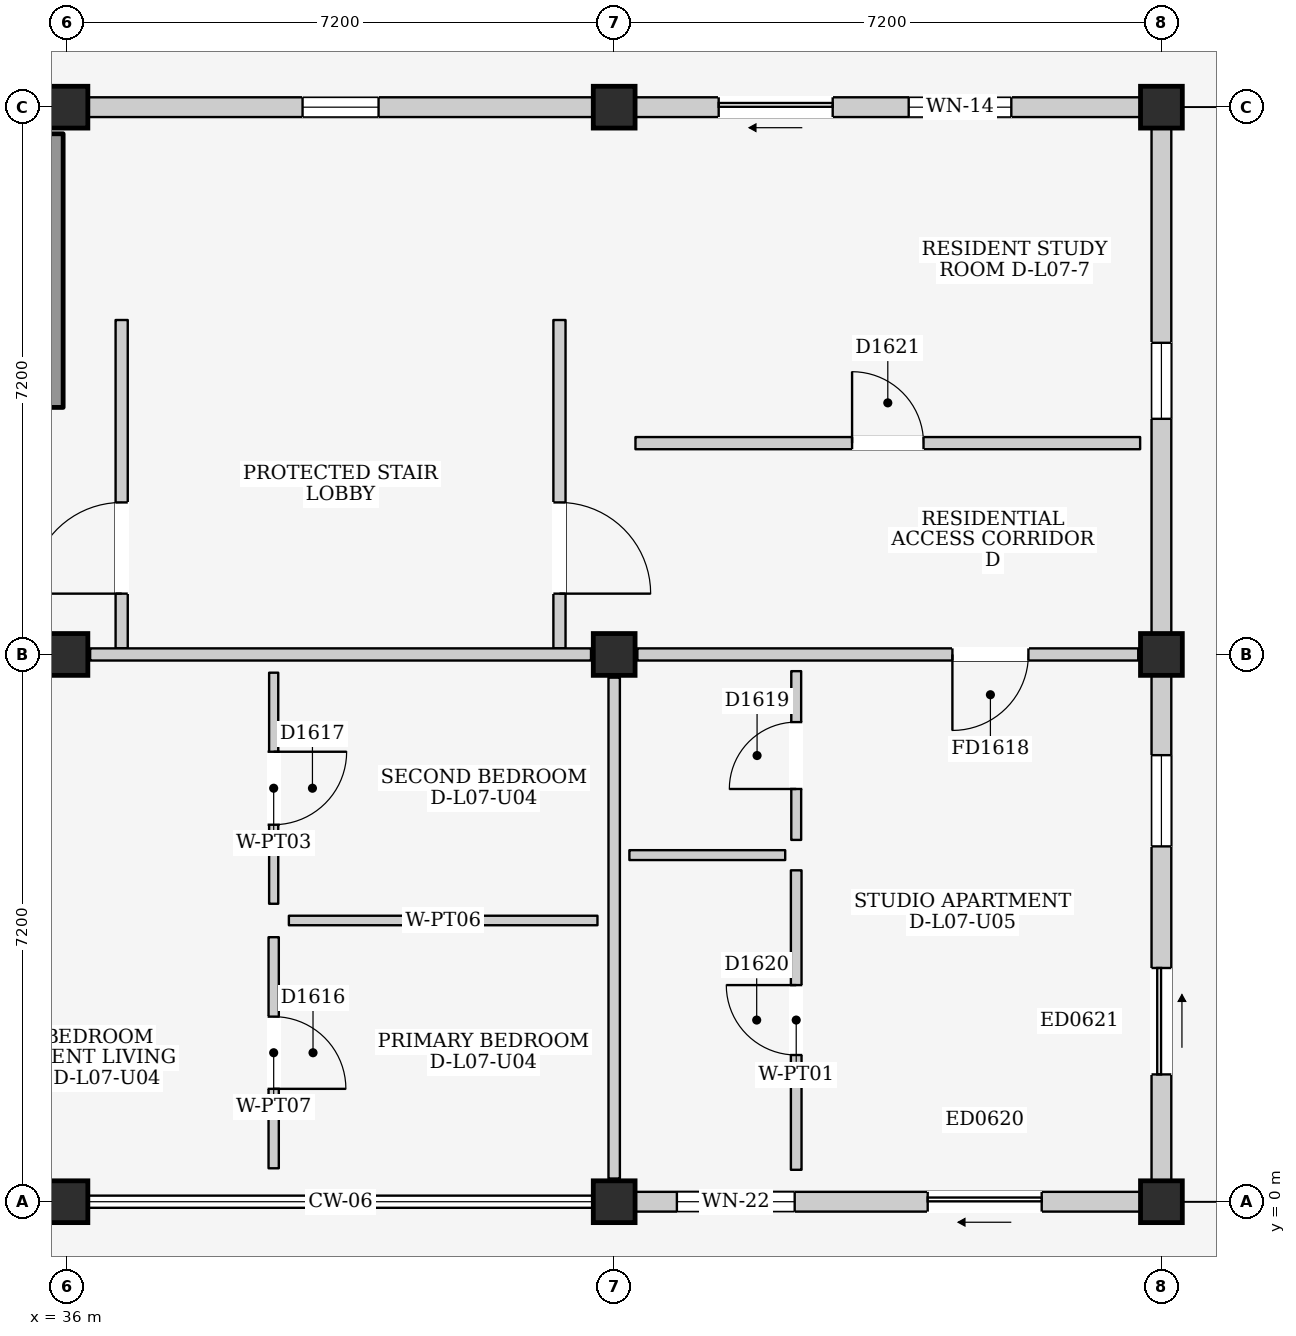
"""IFC4 building model, lengths in metres.
Left out: names, types, materials, properties, quantities, classifications, styles, units other than length and angle.
Written with IfcOpenShell. Run it as: python <this file> out.ifc"""

import sys

from ifc_helpers import new_model, si_unit, direction, frame, frame_2d, origin, origin_2d, place, context, subcontext, project, spatial, rectangle, extrude, element, fill, save


model = new_model("IFC4")
c1 = context("Model", 3, precision=1e-05, world=origin(), true_north=direction((0.0, 1.0)))
c2 = subcontext(c1, "Body", "Model", "MODEL_VIEW")
j1 = project(units=[si_unit("LENGTHUNIT", "METRE"), si_unit("PLANEANGLEUNIT", "RADIAN")], contexts=[c1])
p1 = place(None, origin())
s1 = spatial("IfcSite", under=j1, at=p1, CompositionType="ELEMENT")
p2 = place(p1, origin())
s2 = spatial("IfcBuilding", under=s1, at=p2, CompositionType="ELEMENT")
p3 = place(p2, frame((0.0, 0.0, 25.1)))
s3 = spatial("IfcBuildingStorey", under=s2, at=p3, CompositionType="ELEMENT", Elevation=25.1)
for number, where, z_axis, x_axis in (
    (1, (36.0, 0.0, 0.0), (0.0, 0.0, 1.0), (1.0, 0.0, 0.0)),
    (2, (36.0, 7.2, 0.0), (0.0, 0.0, 1.0), (1.0, 0.0, 0.0)),
    (3, (36.0, 14.4, 0.0), (0.0, 0.0, 1.0), (1.0, 0.0, 0.0)),
    (4, (43.2, 0.0, 0.0), (0.0, 0.0, 1.0), (1.0, 0.0, 0.0)),
    (5, (43.2, 7.2, 0.0), (0.0, 0.0, 1.0), (1.0, 0.0, 0.0)),
    (6, (43.2, 14.4, 0.0), (0.0, 0.0, 1.0), (1.0, 0.0, 0.0)),
    (7, (50.4, 0.0, 0.0), (0.0, 0.0, 1.0), (1.0, 0.0, 0.0)),
    (8, (50.4, 7.2, 0.0), (0.0, 0.0, 1.0), (1.0, 0.0, 0.0)),
    (9, (50.4, 14.4, 0.0), (0.0, 0.0, 1.0), (1.0, 0.0, 0.0)),
):
    element("IfcColumn", number, at=place(p3, frame(where, z_axis=z_axis, x_axis=x_axis)), inside=s3, PredefinedType="COLUMN", context=c2, shape_type="SweptSolid", body=[
        extrude(rectangle(XDim=0.55, YDim=0.55, at=origin_2d()), origin(), (0.0, 0.0, 1.0), 3.2),
    ])
p4 = place(p3, frame((36.275, 14.4, 0.0), z_axis=(0.0, 0.0, 1.0), x_axis=(1.0, 0.0, 0.0)))
e10 = element("IfcWall", 10, at=p4, inside=s3, PredefinedType="ELEMENTEDWALL", context=c2, shape_type="SweptSolid", body=[
    extrude(rectangle(XDim=6.65, YDim=0.26, at=frame_2d((3.325, 0.0))), origin(), (0.0, 0.0, 1.0), 2.375),
])
p5 = place(p4, frame((2.825, 0.0, 1.2)))
e11 = element("IfcOpeningElement", 11, at=p5, cuts=e10, PredefinedType="OPENING", context=c2, shape_type="SweptSolid", body=[
    extrude(rectangle(XDim=1.0, YDim=0.9, at=frame_2d((0.5, 0.45))), frame((0.0, 0.145, 0.0), z_axis=(0.0, -1.0, 0.0), x_axis=(1.0, 0.0, 0.0)), (0.0, 0.0, 1.0), 0.29),
])
p6 = place(p3, frame((43.475, 0.0, 0.0), z_axis=(0.0, 0.0, 1.0), x_axis=(1.0, 0.0, 0.0)))
e12 = element("IfcWall", 12, at=p6, inside=s3, PredefinedType="ELEMENTEDWALL", context=c2, shape_type="SweptSolid", body=[
    extrude(rectangle(XDim=6.65, YDim=0.26, at=frame_2d((3.325, 0.0))), origin(), (0.0, 0.0, 1.0), 2.525),
])
p7 = place(p6, frame((3.85, 0.0, 0.0)))
e13 = element("IfcOpeningElement", 13, at=p7, cuts=e12, PredefinedType="OPENING", context=c2, shape_type="SweptSolid", body=[
    extrude(rectangle(XDim=1.5, YDim=2.12, at=frame_2d((0.75, 1.06))), frame((0.0, 0.145, 0.0), z_axis=(0.0, -1.0, 0.0), x_axis=(1.0, 0.0, 0.0)), (0.0, 0.0, 1.0), 0.29),
])
p8 = place(p6, frame((0.55, 0.0, 0.9)))
e14 = element("IfcOpeningElement", 14, at=p8, cuts=e12, PredefinedType="OPENING", context=c2, shape_type="SweptSolid", body=[
    extrude(rectangle(XDim=1.55, YDim=1.45, at=frame_2d((0.775, 0.725))), frame((0.0, 0.145, 0.0), z_axis=(0.0, -1.0, 0.0), x_axis=(1.0, 0.0, 0.0)), (0.0, 0.0, 1.0), 0.29),
])
p9 = place(p3, frame((50.4, 0.275, 0.0), z_axis=(0.0, 0.0, 1.0), x_axis=(0.0, 1.0, 0.0)))
e15 = element("IfcWall", 15, at=p9, inside=s3, PredefinedType="ELEMENTEDWALL", context=c2, shape_type="SweptSolid", body=[
    extrude(rectangle(XDim=6.65, YDim=0.26, at=frame_2d((3.325, 0.0))), origin(), (0.0, 0.0, 1.0), 2.475),
])
p10 = place(p9, frame((1.4, 0.0, 0.0)))
e16 = element("IfcOpeningElement", 16, at=p10, cuts=e15, PredefinedType="OPENING", context=c2, shape_type="SweptSolid", body=[
    extrude(rectangle(XDim=1.4, YDim=2.1, at=frame_2d((0.7, 1.05))), frame((0.0, 0.145, 0.0), z_axis=(0.0, -1.0, 0.0), x_axis=(1.0, 0.0, 0.0)), (0.0, 0.0, 1.0), 0.29),
])
p11 = place(p9, frame((4.4, 0.0, 0.95)))
e17 = element("IfcOpeningElement", 17, at=p11, cuts=e15, PredefinedType="OPENING", context=c2, shape_type="SweptSolid", body=[
    extrude(rectangle(XDim=1.2, YDim=1.35, at=frame_2d((0.6, 0.675))), frame((0.0, 0.145, 0.0), z_axis=(0.0, -1.0, 0.0), x_axis=(1.0, 0.0, 0.0)), (0.0, 0.0, 1.0), 0.29),
])
p12 = place(p3, frame((43.475, 14.4, 0.0), z_axis=(0.0, 0.0, 1.0), x_axis=(1.0, 0.0, 0.0)))
e18 = element("IfcWall", 18, at=p12, inside=s3, PredefinedType="ELEMENTEDWALL", context=c2, shape_type="SweptSolid", body=[
    extrude(rectangle(XDim=6.65, YDim=0.26, at=frame_2d((3.325, 0.0))), origin(), (0.0, 0.0, 1.0), 2.375),
])
p13 = place(p12, frame((1.1, 0.0, 0.0)))
e19 = element("IfcOpeningElement", 19, at=p13, cuts=e18, PredefinedType="OPENING", context=c2, shape_type="SweptSolid", body=[
    extrude(rectangle(XDim=1.5, YDim=2.12, at=frame_2d((0.75, 1.06))), frame((0.0, 0.145, 0.0), z_axis=(0.0, -1.0, 0.0), x_axis=(1.0, 0.0, 0.0)), (0.0, 0.0, 1.0), 0.29),
])
p14 = place(p12, frame((3.6, 0.0, 0.765)))
e20 = element("IfcOpeningElement", 20, at=p14, cuts=e18, PredefinedType="OPENING", context=c2, shape_type="SweptSolid", body=[
    extrude(rectangle(XDim=1.35, YDim=1.5, at=frame_2d((0.675, 0.75))), frame((0.0, 0.145, 0.0), z_axis=(0.0, -1.0, 0.0), x_axis=(1.0, 0.0, 0.0)), (0.0, 0.0, 1.0), 0.29),
])
p15 = place(p3, frame((50.4, 7.475, 0.0), z_axis=(0.0, 0.0, 1.0), x_axis=(0.0, 1.0, 0.0)))
e21 = element("IfcWall", 21, at=p15, inside=s3, PredefinedType="ELEMENTEDWALL", context=c2, shape_type="SweptSolid", body=[
    extrude(rectangle(XDim=6.65, YDim=0.26, at=frame_2d((3.325, 0.0))), origin(), (0.0, 0.0, 1.0), 2.475),
])
p16 = place(p15, frame((2.825, 0.0, 1.1)))
e22 = element("IfcOpeningElement", 22, at=p16, cuts=e21, PredefinedType="OPENING", context=c2, shape_type="SweptSolid", body=[
    extrude(rectangle(XDim=1.0, YDim=0.9, at=frame_2d((0.5, 0.45))), frame((0.0, 0.145, 0.0), z_axis=(0.0, -1.0, 0.0), x_axis=(1.0, 0.0, 0.0)), (0.0, 0.0, 1.0), 0.29),
])
p17 = place(p3, frame((35.8, 10.45, 0.0), z_axis=(0.0, 0.0, 1.0), x_axis=(0.0, 1.0, 0.0)))
e23 = element("IfcWall", 23, at=p17, inside=s3, PredefinedType="SHEAR", context=c2, shape_type="SweptSolid", body=[
    extrude(rectangle(XDim=3.6, YDim=0.3, at=frame_2d((1.8, 0.0))), origin(), (0.0, 0.0, 1.0), 2.99),
])
p18 = place(p3, frame((36.72, 7.28, 0.0), z_axis=(0.0, 0.0, 1.0), x_axis=(0.0, 1.0, 0.0)))
e24 = element("IfcWall", 24, at=p18, inside=s3, PredefinedType="PARTITIONING", context=c2, shape_type="SweptSolid", body=[
    extrude(rectangle(XDim=4.32, YDim=0.16, at=frame_2d((2.16, 0.0))), origin(), (0.0, 0.0, 1.0), 2.99),
])
p19 = place(p18, frame((0.72, 0.0, 0.0)))
e25 = element("IfcOpeningElement", 25, at=p19, cuts=e24, PredefinedType="OPENING", context=c2, shape_type="SweptSolid", body=[
    extrude(rectangle(XDim=1.2, YDim=2.2, at=frame_2d((0.6, 1.1))), frame((0.0, 0.095, 0.0), z_axis=(0.0, -1.0, 0.0), x_axis=(1.0, 0.0, 0.0)), (0.0, 0.0, 1.0), 0.19),
])
p20 = place(p3, frame((42.48, 7.28, 0.0), z_axis=(0.0, 0.0, 1.0), x_axis=(0.0, 1.0, 0.0)))
e26 = element("IfcWall", 26, at=p20, inside=s3, PredefinedType="PARTITIONING", context=c2, shape_type="SweptSolid", body=[
    extrude(rectangle(XDim=4.32, YDim=0.16, at=frame_2d((2.16, 0.0))), origin(), (0.0, 0.0, 1.0), 2.99),
])
p21 = place(p20, frame((0.72, 0.0, 0.0)))
e27 = element("IfcOpeningElement", 27, at=p21, cuts=e26, PredefinedType="OPENING", context=c2, shape_type="SweptSolid", body=[
    extrude(rectangle(XDim=1.2, YDim=2.2, at=frame_2d((0.6, 1.1))), frame((0.0, 0.095, 0.0), z_axis=(0.0, -1.0, 0.0), x_axis=(1.0, 0.0, 0.0)), (0.0, 0.0, 1.0), 0.19),
])
p22 = place(p3, frame((36.305, 7.2, 0.0), z_axis=(0.0, 0.0, 1.0), x_axis=(1.0, 0.0, 0.0)))
e28 = element("IfcWall", 28, at=p22, inside=s3, PredefinedType="PARTITIONING", context=c2, shape_type="SweptSolid", body=[
    extrude(rectangle(XDim=6.59, YDim=0.16, at=frame_2d((3.295, 0.0))), origin(), (0.0, 0.0, 1.0), 2.375),
])
p23 = place(p3, frame((43.2, 0.305, 0.0), z_axis=(0.0, 0.0, 1.0), x_axis=(0.0, 1.0, 0.0)))
e29 = element("IfcWall", 29, at=p23, inside=s3, PredefinedType="PARTITIONING", context=c2, shape_type="SweptSolid", body=[
    extrude(rectangle(XDim=6.59, YDim=0.15, at=frame_2d((3.295, 0.0))), origin(), (0.0, 0.0, 1.0), 2.475),
])
p24 = place(p3, frame((38.72, 0.44, 0.0), z_axis=(0.0, 0.0, 1.0), x_axis=(0.0, 1.0, 0.0)))
e30 = element("IfcWall", 30, at=p24, inside=s3, PredefinedType="PARTITIONING", context=c2, shape_type="SweptSolid", body=[
    extrude(rectangle(XDim=3.04, YDim=0.135, at=frame_2d((1.52, 0.0))), origin(), (0.0, 0.0, 1.0), 2.99),
])
p25 = place(p24, frame((1.045, 0.0, 0.0)))
e31 = element("IfcOpeningElement", 31, at=p25, cuts=e30, PredefinedType="OPENING", context=c2, shape_type="SweptSolid", body=[
    extrude(rectangle(XDim=0.95, YDim=2.15, at=frame_2d((0.475, 1.075))), frame((0.0, 0.083, 0.0), z_axis=(0.0, -1.0, 0.0), x_axis=(1.0, 0.0, 0.0)), (0.0, 0.0, 1.0), 0.165),
])
p26 = place(p3, frame((38.92, 3.7, 0.0), z_axis=(0.0, 0.0, 1.0), x_axis=(1.0, 0.0, 0.0)))
e32 = element("IfcWall", 32, at=p26, inside=s3, PredefinedType="PARTITIONING", context=c2, shape_type="SweptSolid", body=[
    extrude(rectangle(XDim=4.06, YDim=0.125, at=frame_2d((2.03, 0.0))), origin(), (0.0, 0.0, 1.0), 2.99),
])
p27 = place(p3, frame((38.72, 3.92, 0.0), z_axis=(0.0, 0.0, 1.0), x_axis=(0.0, 1.0, 0.0)))
e33 = element("IfcWall", 33, at=p27, inside=s3, PredefinedType="PARTITIONING", context=c2, shape_type="SweptSolid", body=[
    extrude(rectangle(XDim=3.04, YDim=0.12, at=frame_2d((1.52, 0.0))), origin(), (0.0, 0.0, 1.0), 2.99),
])
p28 = place(p27, frame((1.04, 0.0, 0.0)))
e34 = element("IfcOpeningElement", 34, at=p28, cuts=e33, PredefinedType="OPENING", context=c2, shape_type="SweptSolid", body=[
    extrude(rectangle(XDim=0.96, YDim=2.15, at=frame_2d((0.48, 1.075))), frame((0.0, 0.075, 0.0), z_axis=(0.0, -1.0, 0.0), x_axis=(1.0, 0.0, 0.0)), (0.0, 0.0, 1.0), 0.15),
])
p29 = place(p3, frame((43.505, 7.2, 0.0), z_axis=(0.0, 0.0, 1.0), x_axis=(1.0, 0.0, 0.0)))
e35 = element("IfcWall", 35, at=p29, inside=s3, PredefinedType="PARTITIONING", context=c2, shape_type="SweptSolid", body=[
    extrude(rectangle(XDim=6.59, YDim=0.16, at=frame_2d((3.295, 0.0))), origin(), (0.0, 0.0, 1.0), 2.375),
])
p30 = place(p29, frame((4.145, 0.0, 0.0)))
e36 = element("IfcOpeningElement", 36, at=p30, cuts=e35, PredefinedType="OPENING", context=c2, shape_type="SweptSolid", body=[
    extrude(rectangle(XDim=1.0, YDim=2.15, at=frame_2d((0.5, 1.075))), frame((0.0, 0.095, 0.0), z_axis=(0.0, -1.0, 0.0), x_axis=(1.0, 0.0, 0.0)), (0.0, 0.0, 1.0), 0.19),
])
p31 = place(p3, frame((43.4, 4.56, 0.0), z_axis=(0.0, 0.0, 1.0), x_axis=(1.0, 0.0, 0.0)))
e37 = element("IfcWall", 37, at=p31, inside=s3, PredefinedType="PARTITIONING", context=c2, shape_type="SweptSolid", body=[
    extrude(rectangle(XDim=2.05, YDim=0.13, at=frame_2d((1.025, 0.0))), origin(), (0.0, 0.0, 1.0), 2.99),
])
p32 = place(p3, frame((45.595, 4.76, 0.0), z_axis=(0.0, 0.0, 1.0), x_axis=(0.0, 1.0, 0.0)))
e38 = element("IfcWall", 38, at=p32, inside=s3, PredefinedType="PARTITIONING", context=c2, shape_type="SweptSolid", body=[
    extrude(rectangle(XDim=2.22, YDim=0.13, at=frame_2d((1.11, 0.0))), origin(), (0.0, 0.0, 1.0), 2.99),
])
p33 = place(p32, frame((0.67, 0.0, 0.0)))
e39 = element("IfcOpeningElement", 39, at=p33, cuts=e38, PredefinedType="OPENING", context=c2, shape_type="SweptSolid", body=[
    extrude(rectangle(XDim=0.88, YDim=2.1, at=frame_2d((0.44, 1.05))), frame((0.0, 0.08, 0.0), z_axis=(0.0, -1.0, 0.0), x_axis=(1.0, 0.0, 0.0)), (0.0, 0.0, 1.0), 0.16),
])
p34 = place(p3, frame((45.595, 0.42, 0.0), z_axis=(0.0, 0.0, 1.0), x_axis=(0.0, 1.0, 0.0)))
e40 = element("IfcWall", 40, at=p34, inside=s3, PredefinedType="PARTITIONING", context=c2, shape_type="SweptSolid", body=[
    extrude(rectangle(XDim=3.94, YDim=0.14, at=frame_2d((1.97, 0.0))), origin(), (0.0, 0.0, 1.0), 2.99),
])
p35 = place(p34, frame((1.51, 0.0, 0.0)))
e41 = element("IfcOpeningElement", 41, at=p35, cuts=e40, PredefinedType="OPENING", context=c2, shape_type="SweptSolid", body=[
    extrude(rectangle(XDim=0.92, YDim=2.1, at=frame_2d((0.46, 1.05))), frame((0.0, 0.085, 0.0), z_axis=(0.0, -1.0, 0.0), x_axis=(1.0, 0.0, 0.0)), (0.0, 0.0, 1.0), 0.17),
])
p36 = place(p3, frame((43.48, 9.98, 0.0), z_axis=(0.0, 0.0, 1.0), x_axis=(1.0, 0.0, 0.0)))
e42 = element("IfcWall", 42, at=p36, inside=s3, PredefinedType="PARTITIONING", context=c2, shape_type="SweptSolid", body=[
    extrude(rectangle(XDim=6.64, YDim=0.16, at=frame_2d((3.32, 0.0))), origin(), (0.0, 0.0, 1.0), 2.99),
])
p37 = place(p36, frame((2.85, 0.0, 0.0)))
e43 = element("IfcOpeningElement", 43, at=p37, cuts=e42, PredefinedType="OPENING", context=c2, shape_type="SweptSolid", body=[
    extrude(rectangle(XDim=0.94, YDim=2.12, at=frame_2d((0.47, 1.06))), frame((0.0, 0.095, 0.0), z_axis=(0.0, -1.0, 0.0), x_axis=(1.0, 0.0, 0.0)), (0.0, 0.0, 1.0), 0.19),
])
p38 = place(p5, origin())
e44 = element("IfcWindow", 44, at=p38, inside=s3, PartitioningType="SINGLE_PANEL", PredefinedType="WINDOW", context=c2, shape_type="SweptSolid", body=[
    extrude(rectangle(XDim=1.0, YDim=0.9, at=frame_2d((0.5, 0.45))), frame((0.0, 0.03, 0.0), z_axis=(0.0, -1.0, 0.0), x_axis=(1.0, 0.0, 0.0)), (0.0, 0.0, 1.0), 0.06),
])
fill(e11, e44)
p39 = place(p7, frame((1.5, 0.0, 0.0), z_axis=(0.0, 0.0, 1.0), x_axis=(-1.0, 0.0, 0.0)))
e45 = element("IfcDoor", 45, at=p39, inside=s3, OperationType="SLIDING_TO_LEFT", PredefinedType="DOOR", context=c2, shape_type="SweptSolid", body=[
    extrude(rectangle(XDim=1.5, YDim=2.12, at=frame_2d((0.75, 1.06))), frame((0.0, 0.025, 0.0), z_axis=(0.0, -1.0, 0.0), x_axis=(1.0, 0.0, 0.0)), (0.0, 0.0, 1.0), 0.05),
])
fill(e13, e45)
p40 = place(p8, origin())
e46 = element("IfcWindow", 46, at=p40, inside=s3, PartitioningType="DOUBLE_PANEL_VERTICAL", PredefinedType="WINDOW", context=c2, shape_type="SweptSolid", body=[
    extrude(rectangle(XDim=1.55, YDim=1.45, at=frame_2d((0.775, 0.725))), frame((0.0, 0.03, 0.0), z_axis=(0.0, -1.0, 0.0), x_axis=(1.0, 0.0, 0.0)), (0.0, 0.0, 1.0), 0.06),
])
fill(e14, e46)
p41 = place(p10, frame((1.4, 0.0, 0.0), z_axis=(0.0, 0.0, 1.0), x_axis=(-1.0, 0.0, 0.0)))
e47 = element("IfcDoor", 47, at=p41, inside=s3, OperationType="SLIDING_TO_RIGHT", PredefinedType="DOOR", context=c2, shape_type="SweptSolid", body=[
    extrude(rectangle(XDim=1.4, YDim=2.1, at=frame_2d((0.7, 1.05))), frame((0.0, 0.025, 0.0), z_axis=(0.0, -1.0, 0.0), x_axis=(1.0, 0.0, 0.0)), (0.0, 0.0, 1.0), 0.05),
])
fill(e16, e47)
p42 = place(p11, origin())
e48 = element("IfcWindow", 48, at=p42, inside=s3, PartitioningType="SINGLE_PANEL", PredefinedType="WINDOW", context=c2, shape_type="SweptSolid", body=[
    extrude(rectangle(XDim=1.2, YDim=1.35, at=frame_2d((0.6, 0.675))), frame((0.0, 0.03, 0.0), z_axis=(0.0, -1.0, 0.0), x_axis=(1.0, 0.0, 0.0)), (0.0, 0.0, 1.0), 0.06),
])
fill(e17, e48)
p43 = place(p13, frame((1.5, 0.0, 0.0), z_axis=(0.0, 0.0, 1.0), x_axis=(-1.0, 0.0, 0.0)))
e49 = element("IfcDoor", 49, at=p43, inside=s3, OperationType="SLIDING_TO_LEFT", PredefinedType="DOOR", context=c2, shape_type="SweptSolid", body=[
    extrude(rectangle(XDim=1.5, YDim=2.12, at=frame_2d((0.75, 1.06))), frame((0.0, 0.025, 0.0), z_axis=(0.0, -1.0, 0.0), x_axis=(1.0, 0.0, 0.0)), (0.0, 0.0, 1.0), 0.05),
])
fill(e19, e49)
p44 = place(p14, origin())
e50 = element("IfcWindow", 50, at=p44, inside=s3, PartitioningType="SINGLE_PANEL", PredefinedType="WINDOW", context=c2, shape_type="SweptSolid", body=[
    extrude(rectangle(XDim=1.35, YDim=1.5, at=frame_2d((0.675, 0.75))), frame((0.0, 0.03, 0.0), z_axis=(0.0, -1.0, 0.0), x_axis=(1.0, 0.0, 0.0)), (0.0, 0.0, 1.0), 0.06),
])
fill(e20, e50)
p45 = place(p16, origin())
e51 = element("IfcWindow", 51, at=p45, inside=s3, PartitioningType="SINGLE_PANEL", PredefinedType="WINDOW", context=c2, shape_type="SweptSolid", body=[
    extrude(rectangle(XDim=1.0, YDim=0.9, at=frame_2d((0.5, 0.45))), frame((0.0, 0.03, 0.0), z_axis=(0.0, -1.0, 0.0), x_axis=(1.0, 0.0, 0.0)), (0.0, 0.0, 1.0), 0.06),
])
fill(e22, e51)
p46 = place(p19, origin())
e52 = element("IfcDoor", 52, at=p46, inside=s3, OperationType="SINGLE_SWING_LEFT", PredefinedType="DOOR", context=c2, shape_type="SweptSolid", body=[
    extrude(rectangle(XDim=1.2, YDim=2.2, at=frame_2d((0.6, 1.1))), frame((0.0, 0.025, 0.0), z_axis=(0.0, -1.0, 0.0), x_axis=(1.0, 0.0, 0.0)), (0.0, 0.0, 1.0), 0.05),
])
fill(e25, e52)
p47 = place(p21, frame((1.2, 0.0, 0.0), z_axis=(0.0, 0.0, 1.0), x_axis=(-1.0, 0.0, 0.0)))
e53 = element("IfcDoor", 53, at=p47, inside=s3, OperationType="SINGLE_SWING_RIGHT", PredefinedType="DOOR", context=c2, shape_type="SweptSolid", body=[
    extrude(rectangle(XDim=1.2, YDim=2.2, at=frame_2d((0.6, 1.1))), frame((0.0, 0.025, 0.0), z_axis=(0.0, -1.0, 0.0), x_axis=(1.0, 0.0, 0.0)), (0.0, 0.0, 1.0), 0.05),
])
fill(e27, e53)
p48 = place(p25, frame((0.95, 0.0, 0.0), z_axis=(0.0, 0.0, 1.0), x_axis=(-1.0, 0.0, 0.0)))
e54 = element("IfcDoor", 54, at=p48, inside=s3, OperationType="SINGLE_SWING_RIGHT", PredefinedType="DOOR", context=c2, shape_type="SweptSolid", body=[
    extrude(rectangle(XDim=0.95, YDim=2.15, at=frame_2d((0.475, 1.075))), frame((0.0, 0.025, 0.0), z_axis=(0.0, -1.0, 0.0), x_axis=(1.0, 0.0, 0.0)), (0.0, 0.0, 1.0), 0.05),
])
fill(e31, e54)
p49 = place(p28, frame((0.96, 0.0, 0.0), z_axis=(0.0, 0.0, 1.0), x_axis=(-1.0, 0.0, 0.0)))
e55 = element("IfcDoor", 55, at=p49, inside=s3, OperationType="SINGLE_SWING_LEFT", PredefinedType="DOOR", context=c2, shape_type="SweptSolid", body=[
    extrude(rectangle(XDim=0.96, YDim=2.15, at=frame_2d((0.48, 1.075))), frame((0.0, 0.025, 0.0), z_axis=(0.0, -1.0, 0.0), x_axis=(1.0, 0.0, 0.0)), (0.0, 0.0, 1.0), 0.05),
])
fill(e34, e55)
p50 = place(p30, frame((1.0, 0.0, 0.0), z_axis=(0.0, 0.0, 1.0), x_axis=(-1.0, 0.0, 0.0)))
e56 = element("IfcDoor", 56, at=p50, inside=s3, OperationType="SINGLE_SWING_RIGHT", PredefinedType="DOOR", context=c2, shape_type="SweptSolid", body=[
    extrude(rectangle(XDim=1.0, YDim=2.15, at=frame_2d((0.5, 1.075))), frame((0.0, 0.025, 0.0), z_axis=(0.0, -1.0, 0.0), x_axis=(1.0, 0.0, 0.0)), (0.0, 0.0, 1.0), 0.05),
])
fill(e36, e56)
p51 = place(p33, origin())
e57 = element("IfcDoor", 57, at=p51, inside=s3, OperationType="SINGLE_SWING_LEFT", PredefinedType="DOOR", context=c2, shape_type="SweptSolid", body=[
    extrude(rectangle(XDim=0.88, YDim=2.1, at=frame_2d((0.44, 1.05))), frame((0.0, 0.025, 0.0), z_axis=(0.0, -1.0, 0.0), x_axis=(1.0, 0.0, 0.0)), (0.0, 0.0, 1.0), 0.05),
])
fill(e39, e57)
p52 = place(p35, origin())
e58 = element("IfcDoor", 58, at=p52, inside=s3, OperationType="SINGLE_SWING_RIGHT", PredefinedType="DOOR", context=c2, shape_type="SweptSolid", body=[
    extrude(rectangle(XDim=0.92, YDim=2.1, at=frame_2d((0.46, 1.05))), frame((0.0, 0.025, 0.0), z_axis=(0.0, -1.0, 0.0), x_axis=(1.0, 0.0, 0.0)), (0.0, 0.0, 1.0), 0.05),
])
fill(e41, e58)
p53 = place(p37, origin())
e59 = element("IfcDoor", 59, at=p53, inside=s3, OperationType="SINGLE_SWING_LEFT", PredefinedType="DOOR", context=c2, shape_type="SweptSolid", body=[
    extrude(rectangle(XDim=0.94, YDim=2.12, at=frame_2d((0.47, 1.06))), frame((0.0, 0.025, 0.0), z_axis=(0.0, -1.0, 0.0), x_axis=(1.0, 0.0, 0.0)), (0.0, 0.0, 1.0), 0.05),
])
fill(e43, e59)
save(model, sys.argv[1])
